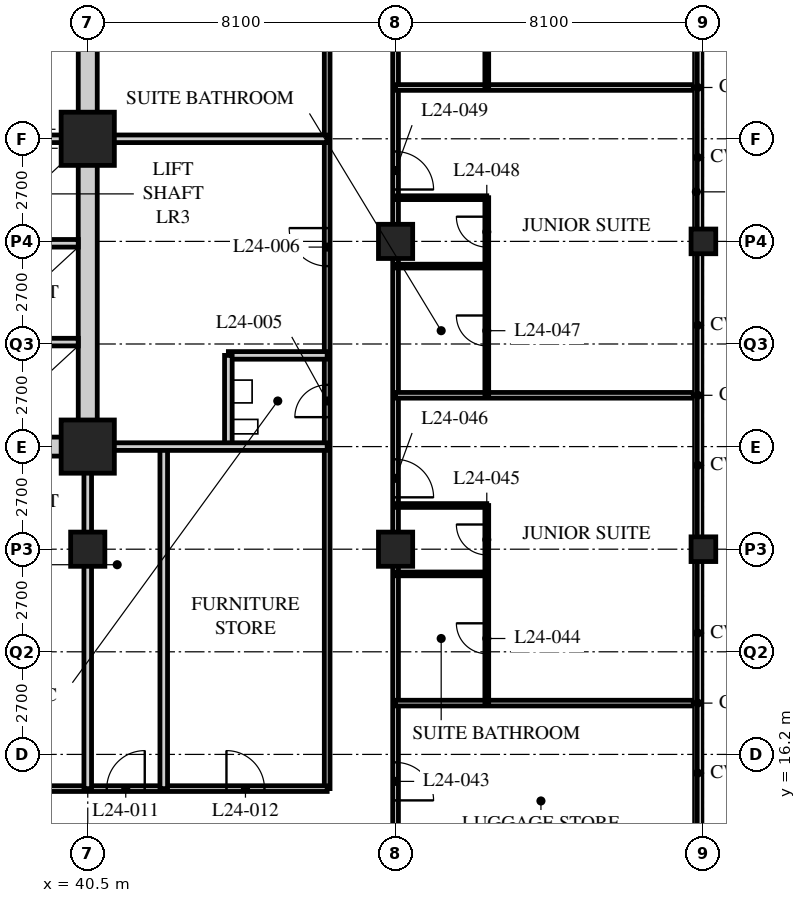
"""IFC4 building model, lengths in metres.
Left out: names, types, materials, properties, quantities, classifications, styles, units other than length and angle.
Written with IfcOpenShell. Run it as: python <this file> out.ifc"""

import sys

from ifc_helpers import new_model, si_unit, direction, frame, frame_2d, origin, origin_2d, place, context, subcontext, project, spatial, rectangle, hollow_rectangle, extrude, element, fill, save


model = new_model("IFC4")
c1 = context("Model", 3, precision=1e-05, world=origin(), true_north=direction((0.0, 1.0)))
c2 = subcontext(c1, "Body", "Model", "MODEL_VIEW")
j1 = project(units=[si_unit("LENGTHUNIT", "METRE"), si_unit("PLANEANGLEUNIT", "RADIAN")], contexts=[c1])
p1 = place(None, origin())
s1 = spatial("IfcSite", under=j1, at=p1, CompositionType="ELEMENT")
p2 = place(p1, origin())
s2 = spatial("IfcBuilding", under=s1, at=p2, CompositionType="ELEMENT")
p3 = place(p2, frame((0.0, 0.0, 98.0)))
s3 = spatial("IfcBuildingStorey", under=s2, at=p3, CompositionType="ELEMENT", Elevation=98.0)
p4 = place(p3, frame((40.5, 21.6, 0.0), z_axis=(0.0, 0.0, 1.0), x_axis=(1.0, 0.0, 0.0)))
e1 = element("IfcColumn", 1, at=p4, inside=s3, PredefinedType="COLUMN", context=c2, shape_type="SweptSolid", body=[
    extrude(hollow_rectangle(XDim=0.9, YDim=0.9, WallThickness=0.1, at=origin_2d()), origin(), (0.0, 0.0, 1.0), 5.4),
])
for number, where, z_axis, x_axis in (
    (2, (40.5, 24.3, 0.0), (0.0, 0.0, 1.0), (1.0, 0.0, 0.0)),
    (3, (40.5, 32.4, 0.0), (0.0, 0.0, 1.0), (1.0, 0.0, 0.0)),
):
    element("IfcColumn", number, at=place(p3, frame(where, z_axis=z_axis, x_axis=x_axis)), inside=s3, PredefinedType="COLUMN", context=c2, shape_type="SweptSolid", body=[
        extrude(hollow_rectangle(XDim=1.4, YDim=1.4, WallThickness=0.12, at=origin_2d()), origin(), (0.0, 0.0, 1.0), 5.4),
    ])
for number, where, z_axis, x_axis in (
    (4, (48.6, 21.6, 0.0), (0.0, 0.0, 1.0), (1.0, 0.0, 0.0)),
    (5, (48.6, 29.7, 0.0), (0.0, 0.0, 1.0), (1.0, 0.0, 0.0)),
):
    element("IfcColumn", number, at=place(p3, frame(where, z_axis=z_axis, x_axis=x_axis)), inside=s3, PredefinedType="COLUMN", context=c2, shape_type="SweptSolid", body=[
        extrude(hollow_rectangle(XDim=0.9, YDim=0.9, WallThickness=0.1, at=origin_2d()), origin(), (0.0, 0.0, 1.0), 5.4),
    ])
for number, where, z_axis, x_axis in (
    (6, (56.7, 21.6, 0.0), (0.0, 0.0, 1.0), (1.0, 0.0, 0.0)),
    (7, (56.7, 29.7, 0.0), (0.0, 0.0, 1.0), (1.0, 0.0, 0.0)),
):
    element("IfcColumn", number, at=place(p3, frame(where, z_axis=z_axis, x_axis=x_axis)), inside=s3, PredefinedType="COLUMN", context=c2, shape_type="SweptSolid", body=[
        extrude(hollow_rectangle(XDim=0.65, YDim=0.65, WallThickness=0.05, at=origin_2d()), origin(), (0.0, 0.0, 1.0), 5.4),
    ])
p5 = place(p3, frame((48.6, 13.465, 0.0), z_axis=(0.0, 0.0, 1.0), x_axis=(0.0, 1.0, 0.0)))
e8 = element("IfcWall", 8, at=p5, inside=s3, PredefinedType="PARTITIONING", context=c2, shape_type="SweptSolid", body=[
    extrude(rectangle(XDim=32.435, YDim=0.15, at=frame_2d((16.217, 0.0))), origin(), (0.0, 0.0, 1.0), 4.49),
])
p6 = place(p5, frame((1.525, 0.0, 0.0)))
e9 = element("IfcOpeningElement", 9, at=p6, cuts=e8, PredefinedType="OPENING", context=c2, shape_type="SweptSolid", body=[
    extrude(rectangle(XDim=1.0, YDim=2.1, at=frame_2d((0.5, 1.05))), frame((0.0, 0.085, 0.0), z_axis=(0.0, -1.0, 0.0), x_axis=(1.0, 0.0, 0.0)), (0.0, 0.0, 1.0), 0.17),
])
p7 = place(p5, frame((9.5, 0.0, 0.0)))
e10 = element("IfcOpeningElement", 10, at=p7, cuts=e8, PredefinedType="OPENING", context=c2, shape_type="SweptSolid", body=[
    extrude(rectangle(XDim=1.0, YDim=2.1, at=frame_2d((0.5, 1.05))), frame((0.0, 0.085, 0.0), z_axis=(0.0, -1.0, 0.0), x_axis=(1.0, 0.0, 0.0)), (0.0, 0.0, 1.0), 0.17),
])
p8 = place(p5, frame((17.6, 0.0, 0.0)))
e11 = element("IfcOpeningElement", 11, at=p8, cuts=e8, PredefinedType="OPENING", context=c2, shape_type="SweptSolid", body=[
    extrude(rectangle(XDim=1.0, YDim=2.1, at=frame_2d((0.5, 1.05))), frame((0.0, 0.085, 0.0), z_axis=(0.0, -1.0, 0.0), x_axis=(1.0, 0.0, 0.0)), (0.0, 0.0, 1.0), 0.17),
])
p9 = place(p5, frame((25.7, 0.0, 0.0)))
e12 = element("IfcOpeningElement", 12, at=p9, cuts=e8, PredefinedType="OPENING", context=c2, shape_type="SweptSolid", body=[
    extrude(rectangle(XDim=1.0, YDim=2.1, at=frame_2d((0.5, 1.05))), frame((0.0, 0.085, 0.0), z_axis=(0.0, -1.0, 0.0), x_axis=(1.0, 0.0, 0.0)), (0.0, 0.0, 1.0), 0.17),
])
p10 = place(p5, frame((28.95, 0.0, 0.0)))
e13 = element("IfcOpeningElement", 13, at=p10, cuts=e8, PredefinedType="OPENING", context=c2, shape_type="SweptSolid", body=[
    extrude(rectangle(XDim=1.0, YDim=2.1, at=frame_2d((0.5, 1.05))), frame((0.0, 0.085, 0.0), z_axis=(0.0, -1.0, 0.0), x_axis=(1.0, 0.0, 0.0)), (0.0, 0.0, 1.0), 0.17),
])
p11 = place(p3, frame((46.8, 15.3, 0.0), z_axis=(0.0, 0.0, 1.0), x_axis=(0.0, 1.0, 0.0)))
e14 = element("IfcWall", 14, at=p11, inside=s3, PredefinedType="PARTITIONING", context=c2, shape_type="SweptSolid", body=[
    extrude(rectangle(XDim=28.8, YDim=0.15, at=frame_2d((14.4, 0.0))), origin(), (0.0, 0.0, 1.0), 5.19),
])
p12 = place(p11, frame((9.775, 0.0, 0.0)))
e15 = element("IfcOpeningElement", 15, at=p12, cuts=e14, PredefinedType="OPENING", context=c2, shape_type="SweptSolid", body=[
    extrude(rectangle(XDim=0.85, YDim=2.1, at=frame_2d((0.425, 1.05))), frame((0.0, 0.085, 0.0), z_axis=(0.0, -1.0, 0.0), x_axis=(1.0, 0.0, 0.0)), (0.0, 0.0, 1.0), 0.17),
])
p13 = place(p11, frame((13.75, 0.0, 0.0)))
e16 = element("IfcOpeningElement", 16, at=p13, cuts=e14, PredefinedType="OPENING", context=c2, shape_type="SweptSolid", body=[
    extrude(rectangle(XDim=1.0, YDim=2.1, at=frame_2d((0.5, 1.05))), frame((0.0, 0.085, 0.0), z_axis=(0.0, -1.0, 0.0), x_axis=(1.0, 0.0, 0.0)), (0.0, 0.0, 1.0), 0.17),
])
p14 = place(p11, frame((20.65, 0.0, 0.0)))
e17 = element("IfcOpeningElement", 17, at=p14, cuts=e14, PredefinedType="OPENING", context=c2, shape_type="SweptSolid", body=[
    extrude(rectangle(XDim=1.0, YDim=2.1, at=frame_2d((0.5, 1.05))), frame((0.0, 0.085, 0.0), z_axis=(0.0, -1.0, 0.0), x_axis=(1.0, 0.0, 0.0)), (0.0, 0.0, 1.0), 0.17),
])
p15 = place(p3, frame((29.56, 15.3, 0.0), z_axis=(0.0, 0.0, 1.0), x_axis=(1.0, 0.0, 0.0)))
e18 = element("IfcWall", 18, at=p15, inside=s3, PredefinedType="PARTITIONING", context=c2, shape_type="SweptSolid", body=[
    extrude(rectangle(XDim=17.24, YDim=0.15, at=frame_2d((8.62, 0.0))), origin(), (0.0, 0.0, 1.0), 5.19),
])
p16 = place(p15, frame((4.965, 0.0, 0.0)))
e19 = element("IfcOpeningElement", 19, at=p16, cuts=e18, PredefinedType="OPENING", context=c2, shape_type="SweptSolid", body=[
    extrude(rectangle(XDim=1.0, YDim=2.1, at=frame_2d((0.5, 1.05))), frame((0.0, 0.085, 0.0), z_axis=(0.0, -1.0, 0.0), x_axis=(1.0, 0.0, 0.0)), (0.0, 0.0, 1.0), 0.17),
])
p17 = place(p15, frame((11.44, 0.0, 0.0)))
e20 = element("IfcOpeningElement", 20, at=p17, cuts=e18, PredefinedType="OPENING", context=c2, shape_type="SweptSolid", body=[
    extrude(rectangle(XDim=1.0, YDim=2.1, at=frame_2d((0.5, 1.05))), frame((0.0, 0.085, 0.0), z_axis=(0.0, -1.0, 0.0), x_axis=(1.0, 0.0, 0.0)), (0.0, 0.0, 1.0), 0.17),
])
p18 = place(p15, frame((14.59, 0.0, 0.0)))
e21 = element("IfcOpeningElement", 21, at=p18, cuts=e18, PredefinedType="OPENING", context=c2, shape_type="SweptSolid", body=[
    extrude(rectangle(XDim=1.0, YDim=2.1, at=frame_2d((0.5, 1.05))), frame((0.0, 0.085, 0.0), z_axis=(0.0, -1.0, 0.0), x_axis=(1.0, 0.0, 0.0)), (0.0, 0.0, 1.0), 0.17),
])
p19 = place(p3, frame((40.5, 32.4, 0.0), z_axis=(0.0, 0.0, 1.0), x_axis=(1.0, 0.0, 0.0)))
e22 = element("IfcWall", 22, at=p19, inside=s3, PredefinedType="SOLIDWALL", context=c2, shape_type="SweptSolid", body=[
    extrude(rectangle(XDim=6.3, YDim=0.2, at=frame_2d((3.15, 0.0))), origin(), (0.0, 0.0, 1.0), 5.19),
])
p20 = place(p3, frame((46.8, 26.7, 0.0), z_axis=(0.0, 0.0, 1.0), x_axis=(-1.0, 0.0, 0.0)))
e23 = element("IfcWall", 23, at=p20, inside=s3, PredefinedType="SOLIDWALL", context=c2, shape_type="SweptSolid", body=[
    extrude(rectangle(XDim=2.6, YDim=0.2, at=frame_2d((1.3, 0.0))), origin(), (0.0, 0.0, 1.0), 5.19),
])
p21 = place(p3, frame((44.2, 24.3, 0.0), z_axis=(0.0, 0.0, 1.0), x_axis=(0.0, 1.0, 0.0)))
e24 = element("IfcWall", 24, at=p21, inside=s3, PredefinedType="SOLIDWALL", context=c2, shape_type="SweptSolid", body=[
    extrude(rectangle(XDim=2.4, YDim=0.2, at=frame_2d((1.2, 0.0))), origin(), (0.0, 0.0, 1.0), 5.19),
])
p22 = place(p3, frame((40.5, 15.3, 0.0), z_axis=(0.0, 0.0, 1.0), x_axis=(0.0, 1.0, 0.0)))
e25 = element("IfcWall", 25, at=p22, inside=s3, PredefinedType="SOLIDWALL", context=c2, shape_type="SweptSolid", body=[
    extrude(rectangle(XDim=9.0, YDim=0.2, at=frame_2d((4.5, 0.0))), origin(), (0.0, 0.0, 1.0), 4.49),
])
p23 = place(p3, frame((42.5, 15.3, 0.0), z_axis=(0.0, 0.0, 1.0), x_axis=(0.0, 1.0, 0.0)))
e26 = element("IfcWall", 26, at=p23, inside=s3, PredefinedType="SOLIDWALL", context=c2, shape_type="SweptSolid", body=[
    extrude(rectangle(XDim=9.0, YDim=0.2, at=frame_2d((4.5, 0.0))), origin(), (0.0, 0.0, 1.0), 5.19),
])
p24 = place(p3, frame((40.5, 24.3, 0.0), z_axis=(0.0, 0.0, 1.0), x_axis=(1.0, 0.0, 0.0)))
e27 = element("IfcWall", 27, at=p24, inside=s3, PredefinedType="SOLIDWALL", context=c2, shape_type="SweptSolid", body=[
    extrude(rectangle(XDim=6.3, YDim=0.2, at=frame_2d((3.15, 0.0))), origin(), (0.0, 0.0, 1.0), 5.19),
])
p25 = place(p3, frame((48.6, 17.55, 0.0), z_axis=(0.0, 0.0, 1.0), x_axis=(1.0, 0.0, 0.0)))
e28 = element("IfcWall", 28, at=p25, inside=s3, PredefinedType="PARTITIONING", context=c2, shape_type="SweptSolid", body=[
    extrude(rectangle(XDim=7.834, YDim=0.15, at=frame_2d((3.917, 0.0))), origin(), (0.0, 0.0, 1.0), 5.19),
])
p26 = place(p3, frame((51.0, 17.55, 0.0), z_axis=(0.0, 0.0, 1.0), x_axis=(0.0, 1.0, 0.0)))
e29 = element("IfcWall", 29, at=p26, inside=s3, PredefinedType="PARTITIONING", context=c2, shape_type="SweptSolid", body=[
    extrude(rectangle(XDim=5.2, YDim=0.1, at=frame_2d((2.6, 0.0))), origin(), (0.0, 0.0, 1.0), 5.19),
])
p27 = place(p26, frame((1.3, 0.0, 0.0)))
e30 = element("IfcOpeningElement", 30, at=p27, cuts=e29, PredefinedType="OPENING", context=c2, shape_type="SweptSolid", body=[
    extrude(rectangle(XDim=0.8, YDim=2.1, at=frame_2d((0.4, 1.05))), frame((0.0, 0.06, 0.0), z_axis=(0.0, -1.0, 0.0), x_axis=(1.0, 0.0, 0.0)), (0.0, 0.0, 1.0), 0.12),
])
p28 = place(p26, frame((3.9, 0.0, 0.0)))
e31 = element("IfcOpeningElement", 31, at=p28, cuts=e29, PredefinedType="OPENING", context=c2, shape_type="SweptSolid", body=[
    extrude(rectangle(XDim=0.8, YDim=2.1, at=frame_2d((0.4, 1.05))), frame((0.0, 0.06, 0.0), z_axis=(0.0, -1.0, 0.0), x_axis=(1.0, 0.0, 0.0)), (0.0, 0.0, 1.0), 0.12),
])
for number, where, z_axis, x_axis in (
    (32, (48.6, 20.95, 0.0), (0.0, 0.0, 1.0), (1.0, 0.0, 0.0)),
    (33, (48.6, 22.75, 0.0), (0.0, 0.0, 1.0), (1.0, 0.0, 0.0)),
):
    element("IfcWall", number, at=place(p3, frame(where, z_axis=z_axis, x_axis=x_axis)), inside=s3, PredefinedType="PARTITIONING", context=c2, shape_type="SweptSolid", body=[
        extrude(rectangle(XDim=2.4, YDim=0.1, at=frame_2d((1.2, 0.0))), origin(), (0.0, 0.0, 1.0), 5.19),
    ])
p29 = place(p3, frame((48.6, 25.65, 0.0), z_axis=(0.0, 0.0, 1.0), x_axis=(1.0, 0.0, 0.0)))
e34 = element("IfcWall", 34, at=p29, inside=s3, PredefinedType="PARTITIONING", context=c2, shape_type="SweptSolid", body=[
    extrude(rectangle(XDim=7.834, YDim=0.15, at=frame_2d((3.917, 0.0))), origin(), (0.0, 0.0, 1.0), 5.19),
])
p30 = place(p3, frame((51.0, 25.65, 0.0), z_axis=(0.0, 0.0, 1.0), x_axis=(0.0, 1.0, 0.0)))
e35 = element("IfcWall", 35, at=p30, inside=s3, PredefinedType="PARTITIONING", context=c2, shape_type="SweptSolid", body=[
    extrude(rectangle(XDim=5.2, YDim=0.1, at=frame_2d((2.6, 0.0))), origin(), (0.0, 0.0, 1.0), 5.19),
])
p31 = place(p30, frame((1.3, 0.0, 0.0)))
e36 = element("IfcOpeningElement", 36, at=p31, cuts=e35, PredefinedType="OPENING", context=c2, shape_type="SweptSolid", body=[
    extrude(rectangle(XDim=0.8, YDim=2.1, at=frame_2d((0.4, 1.05))), frame((0.0, 0.06, 0.0), z_axis=(0.0, -1.0, 0.0), x_axis=(1.0, 0.0, 0.0)), (0.0, 0.0, 1.0), 0.12),
])
p32 = place(p30, frame((3.9, 0.0, 0.0)))
e37 = element("IfcOpeningElement", 37, at=p32, cuts=e35, PredefinedType="OPENING", context=c2, shape_type="SweptSolid", body=[
    extrude(rectangle(XDim=0.8, YDim=2.1, at=frame_2d((0.4, 1.05))), frame((0.0, 0.06, 0.0), z_axis=(0.0, -1.0, 0.0), x_axis=(1.0, 0.0, 0.0)), (0.0, 0.0, 1.0), 0.12),
])
for number, where, z_axis, x_axis in (
    (38, (48.6, 29.05, 0.0), (0.0, 0.0, 1.0), (1.0, 0.0, 0.0)),
    (39, (48.6, 30.85, 0.0), (0.0, 0.0, 1.0), (1.0, 0.0, 0.0)),
):
    element("IfcWall", number, at=place(p3, frame(where, z_axis=z_axis, x_axis=x_axis)), inside=s3, PredefinedType="PARTITIONING", context=c2, shape_type="SweptSolid", body=[
        extrude(rectangle(XDim=2.4, YDim=0.1, at=frame_2d((1.2, 0.0))), origin(), (0.0, 0.0, 1.0), 5.19),
    ])
p33 = place(p3, frame((48.6, 33.75, 0.0), z_axis=(0.0, 0.0, 1.0), x_axis=(1.0, 0.0, 0.0)))
e40 = element("IfcWall", 40, at=p33, inside=s3, PredefinedType="PARTITIONING", context=c2, shape_type="SweptSolid", body=[
    extrude(rectangle(XDim=7.834, YDim=0.15, at=frame_2d((3.917, 0.0))), origin(), (0.0, 0.0, 1.0), 5.19),
])
p34 = place(p3, frame((51.0, 33.75, 0.0), z_axis=(0.0, 0.0, 1.0), x_axis=(0.0, 1.0, 0.0)))
e41 = element("IfcWall", 41, at=p34, inside=s3, PredefinedType="PARTITIONING", context=c2, shape_type="SweptSolid", body=[
    extrude(rectangle(XDim=5.2, YDim=0.1, at=frame_2d((2.6, 0.0))), origin(), (0.0, 0.0, 1.0), 5.19),
])
p35 = place(p34, frame((1.3, 0.0, 0.0)))
e42 = element("IfcOpeningElement", 42, at=p35, cuts=e41, PredefinedType="OPENING", context=c2, shape_type="SweptSolid", body=[
    extrude(rectangle(XDim=0.8, YDim=2.1, at=frame_2d((0.4, 1.05))), frame((0.0, 0.06, 0.0), z_axis=(0.0, -1.0, 0.0), x_axis=(1.0, 0.0, 0.0)), (0.0, 0.0, 1.0), 0.12),
])
p36 = place(p34, frame((3.9, 0.0, 0.0)))
e43 = element("IfcOpeningElement", 43, at=p36, cuts=e41, PredefinedType="OPENING", context=c2, shape_type="SweptSolid", body=[
    extrude(rectangle(XDim=0.8, YDim=2.1, at=frame_2d((0.4, 1.05))), frame((0.0, 0.06, 0.0), z_axis=(0.0, -1.0, 0.0), x_axis=(1.0, 0.0, 0.0)), (0.0, 0.0, 1.0), 0.12),
])
p37 = place(p3, frame((15.95, 24.3, 0.0), z_axis=(0.0, 0.0, 1.0), x_axis=(1.0, 0.0, 0.0)))
e44 = element("IfcWall", 44, at=p37, inside=s3, PredefinedType="SOLIDWALL", context=c2, shape_type="SweptSolid", body=[
    extrude(rectangle(XDim=24.8, YDim=0.5, at=frame_2d((12.4, 0.0))), origin(), (0.0, 0.0, 1.0), 4.49),
])
p38 = place(p37, frame((11.5, 0.0, 0.0)))
e45 = element("IfcOpeningElement", 45, at=p38, cuts=e44, PredefinedType="OPENING", context=c2, shape_type="SweptSolid", body=[
    extrude(rectangle(XDim=1.8, YDim=2.4, at=frame_2d((0.9, 1.2))), frame((0.0, 0.26, 0.0), z_axis=(0.0, -1.0, 0.0), x_axis=(1.0, 0.0, 0.0)), (0.0, 0.0, 1.0), 0.52),
])
p39 = place(p3, frame((40.5, 24.55, 0.0), z_axis=(0.0, 0.0, 1.0), x_axis=(0.0, 1.0, 0.0)))
e46 = element("IfcWall", 46, at=p39, inside=s3, PredefinedType="SOLIDWALL", context=c2, shape_type="SweptSolid", body=[
    extrude(rectangle(XDim=15.7, YDim=0.5, at=frame_2d((7.85, 0.0))), origin(), (0.0, 0.0, 1.0), 4.49),
])
p40 = place(p3, frame((32.3, 32.4, 0.0), z_axis=(0.0, 0.0, 1.0), x_axis=(1.0, 0.0, 0.0)))
e47 = element("IfcWall", 47, at=p40, inside=s3, PredefinedType="SOLIDWALL", context=c2, shape_type="SweptSolid", body=[
    extrude(rectangle(XDim=7.95, YDim=0.2, at=frame_2d((3.975, 0.0))), origin(), (0.0, 0.0, 1.0), 4.578),
])
for number, where, z_axis, x_axis in (
    (48, (37.65, 27.05, 0.0), (0.0, 0.0, 1.0), (1.0, 0.0, 0.0)),
    (49, (37.65, 29.65, 0.0), (0.0, 0.0, 1.0), (1.0, 0.0, 0.0)),
):
    element("IfcWall", number, at=place(p3, frame(where, z_axis=z_axis, x_axis=x_axis)), inside=s3, PredefinedType="SOLIDWALL", context=c2, shape_type="SweptSolid", body=[
        extrude(rectangle(XDim=2.6, YDim=0.2, at=frame_2d((1.3, 0.0))), origin(), (0.0, 0.0, 1.0), 5.19),
    ])
p41 = place(p12, origin())
e50 = element("IfcDoor", 50, at=p41, inside=s3, OperationType="SINGLE_SWING_LEFT", PredefinedType="DOOR", context=c2, shape_type="SweptSolid", body=[
    extrude(rectangle(XDim=0.85, YDim=2.1, at=frame_2d((0.425, 1.05))), frame((0.0, 0.025, 0.0), z_axis=(0.0, -1.0, 0.0), x_axis=(1.0, 0.0, 0.0)), (0.0, 0.0, 1.0), 0.05),
])
fill(e15, e50)
p42 = place(p13, origin())
e51 = element("IfcDoor", 51, at=p42, inside=s3, OperationType="SINGLE_SWING_RIGHT", PredefinedType="DOOR", context=c2, shape_type="SweptSolid", body=[
    extrude(rectangle(XDim=1.0, YDim=2.1, at=frame_2d((0.5, 1.05))), frame((0.0, 0.025, 0.0), z_axis=(0.0, -1.0, 0.0), x_axis=(1.0, 0.0, 0.0)), (0.0, 0.0, 1.0), 0.05),
])
fill(e16, e51)
p43 = place(p17, origin())
e52 = element("IfcDoor", 52, at=p43, inside=s3, OperationType="SINGLE_SWING_RIGHT", PredefinedType="DOOR", context=c2, shape_type="SweptSolid", body=[
    extrude(rectangle(XDim=1.0, YDim=2.1, at=frame_2d((0.5, 1.05))), frame((0.0, 0.025, 0.0), z_axis=(0.0, -1.0, 0.0), x_axis=(1.0, 0.0, 0.0)), (0.0, 0.0, 1.0), 0.05),
])
fill(e20, e52)
p44 = place(p18, origin())
e53 = element("IfcDoor", 53, at=p44, inside=s3, OperationType="SINGLE_SWING_LEFT", PredefinedType="DOOR", context=c2, shape_type="SweptSolid", body=[
    extrude(rectangle(XDim=1.0, YDim=2.1, at=frame_2d((0.5, 1.05))), frame((0.0, 0.025, 0.0), z_axis=(0.0, -1.0, 0.0), x_axis=(1.0, 0.0, 0.0)), (0.0, 0.0, 1.0), 0.05),
])
fill(e21, e53)
p45 = place(p6, origin())
e54 = element("IfcDoor", 54, at=p45, inside=s3, OperationType="SINGLE_SWING_RIGHT", PredefinedType="DOOR", context=c2, shape_type="SweptSolid", body=[
    extrude(rectangle(XDim=1.0, YDim=2.1, at=frame_2d((0.5, 1.05))), frame((0.0, 0.025, 0.0), z_axis=(0.0, -1.0, 0.0), x_axis=(1.0, 0.0, 0.0)), (0.0, 0.0, 1.0), 0.05),
])
fill(e9, e54)
p46 = place(p27, origin())
e55 = element("IfcDoor", 55, at=p46, inside=s3, OperationType="SINGLE_SWING_RIGHT", PredefinedType="DOOR", context=c2, shape_type="SweptSolid", body=[
    extrude(rectangle(XDim=0.8, YDim=2.1, at=frame_2d((0.4, 1.05))), frame((0.0, 0.025, 0.0), z_axis=(0.0, -1.0, 0.0), x_axis=(1.0, 0.0, 0.0)), (0.0, 0.0, 1.0), 0.05),
])
fill(e30, e55)
p47 = place(p28, origin())
e56 = element("IfcDoor", 56, at=p47, inside=s3, OperationType="SINGLE_SWING_RIGHT", PredefinedType="DOOR", context=c2, shape_type="SweptSolid", body=[
    extrude(rectangle(XDim=0.8, YDim=2.1, at=frame_2d((0.4, 1.05))), frame((0.0, 0.025, 0.0), z_axis=(0.0, -1.0, 0.0), x_axis=(1.0, 0.0, 0.0)), (0.0, 0.0, 1.0), 0.05),
])
fill(e31, e56)
p48 = place(p7, origin())
e57 = element("IfcDoor", 57, at=p48, inside=s3, OperationType="SINGLE_SWING_RIGHT", PredefinedType="DOOR", context=c2, shape_type="SweptSolid", body=[
    extrude(rectangle(XDim=1.0, YDim=2.1, at=frame_2d((0.5, 1.05))), frame((0.0, 0.025, 0.0), z_axis=(0.0, -1.0, 0.0), x_axis=(1.0, 0.0, 0.0)), (0.0, 0.0, 1.0), 0.05),
])
fill(e10, e57)
p49 = place(p31, origin())
e58 = element("IfcDoor", 58, at=p49, inside=s3, OperationType="SINGLE_SWING_RIGHT", PredefinedType="DOOR", context=c2, shape_type="SweptSolid", body=[
    extrude(rectangle(XDim=0.8, YDim=2.1, at=frame_2d((0.4, 1.05))), frame((0.0, 0.025, 0.0), z_axis=(0.0, -1.0, 0.0), x_axis=(1.0, 0.0, 0.0)), (0.0, 0.0, 1.0), 0.05),
])
fill(e36, e58)
p50 = place(p32, origin())
e59 = element("IfcDoor", 59, at=p50, inside=s3, OperationType="SINGLE_SWING_RIGHT", PredefinedType="DOOR", context=c2, shape_type="SweptSolid", body=[
    extrude(rectangle(XDim=0.8, YDim=2.1, at=frame_2d((0.4, 1.05))), frame((0.0, 0.025, 0.0), z_axis=(0.0, -1.0, 0.0), x_axis=(1.0, 0.0, 0.0)), (0.0, 0.0, 1.0), 0.05),
])
fill(e37, e59)
p51 = place(p8, origin())
e60 = element("IfcDoor", 60, at=p51, inside=s3, OperationType="SINGLE_SWING_RIGHT", PredefinedType="DOOR", context=c2, shape_type="SweptSolid", body=[
    extrude(rectangle(XDim=1.0, YDim=2.1, at=frame_2d((0.5, 1.05))), frame((0.0, 0.025, 0.0), z_axis=(0.0, -1.0, 0.0), x_axis=(1.0, 0.0, 0.0)), (0.0, 0.0, 1.0), 0.05),
])
fill(e11, e60)
save(model, sys.argv[1])
